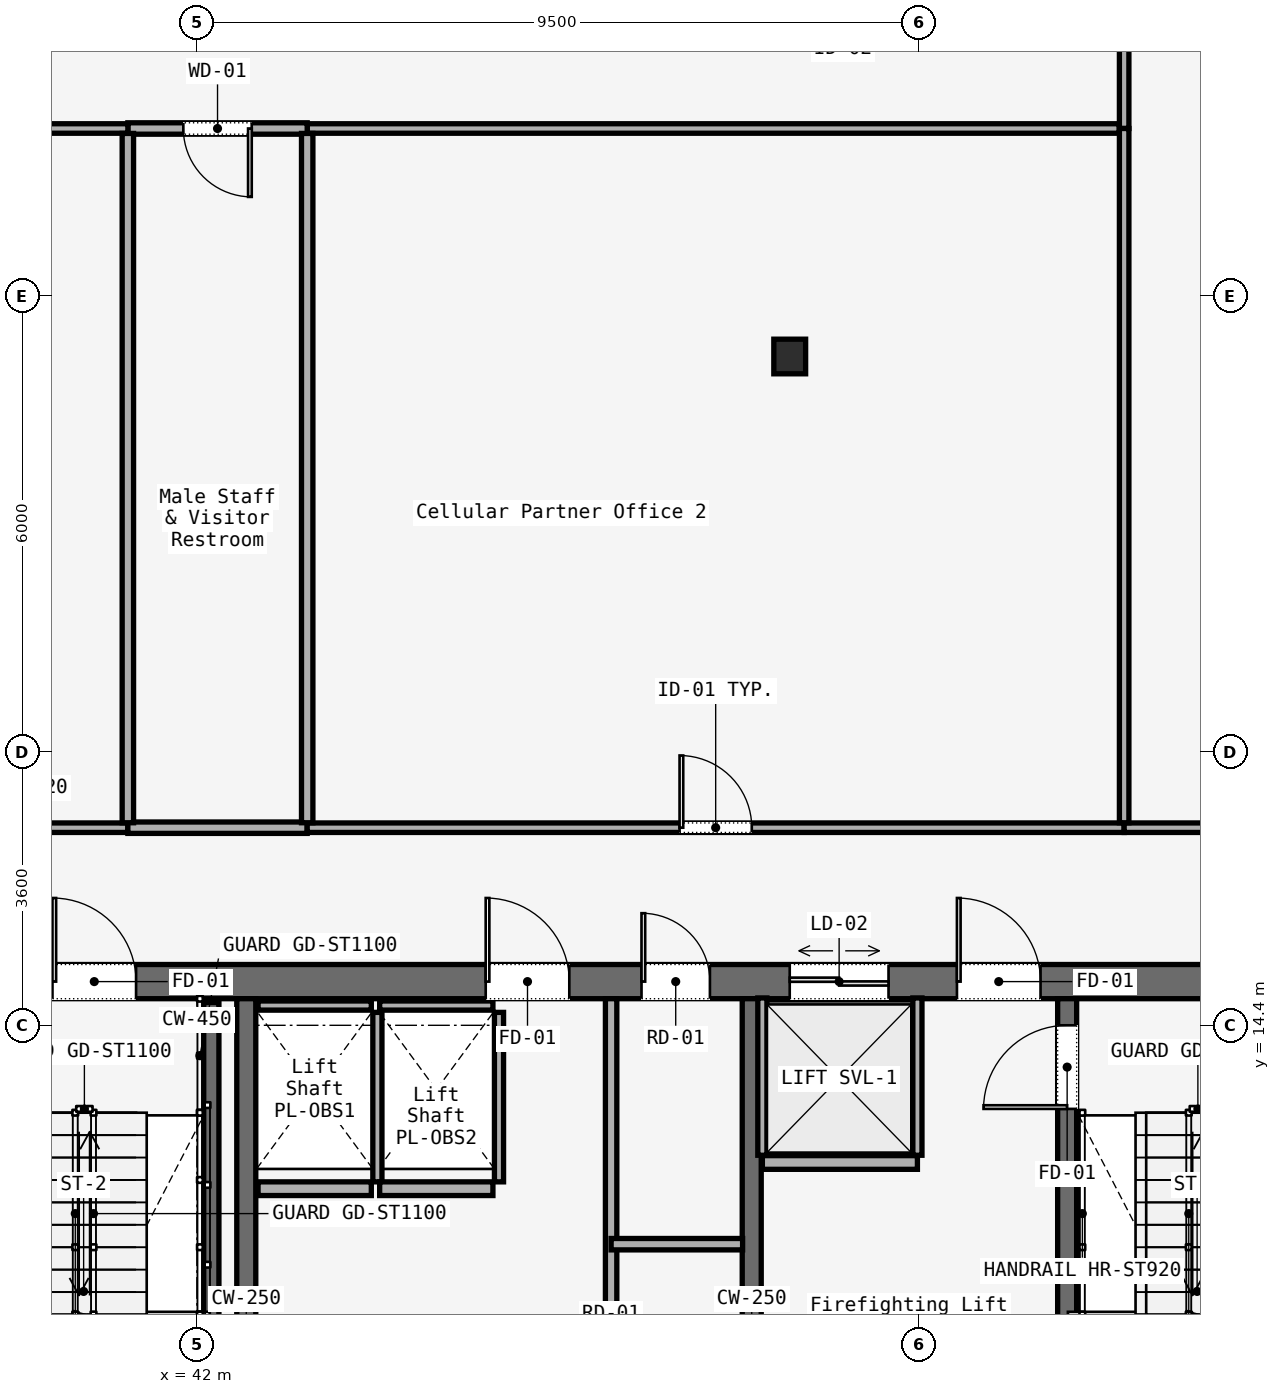
"""IFC4 building model, lengths in metres.
Left out: names, types, materials, properties, quantities, classifications, styles, units other than length and angle.
Written with IfcOpenShell. Run it as: python <this file> out.ifc"""

import sys

from ifc_helpers import new_model, si_unit, direction, frame, frame_2d, origin, origin_2d, place, context, subcontext, project, spatial, rectangle, i_section, extrude, element, fill, save


model = new_model("IFC4")
c1 = context("Model", 3, precision=1e-05, world=origin(), true_north=direction((0.0, 1.0)))
c2 = subcontext(c1, "Body", "Model", "MODEL_VIEW")
j1 = project(units=[si_unit("LENGTHUNIT", "METRE"), si_unit("PLANEANGLEUNIT", "RADIAN")], contexts=[c1])
p1 = place(None, origin())
s1 = spatial("IfcSite", under=j1, at=p1, CompositionType="ELEMENT")
p2 = place(p1, origin())
s2 = spatial("IfcBuilding", under=s1, at=p2, CompositionType="ELEMENT")
p3 = place(p2, frame((0.0, 0.0, 89.2)))
s3 = spatial("IfcBuildingStorey", under=s2, at=p3, CompositionType="ELEMENT", Elevation=89.2)
p4 = place(p3, frame((26.45, 14.975, 0.0), z_axis=(0.0, 0.0, 1.0), x_axis=(1.0, 0.0, 0.0)))
e1 = element("IfcWall", 1, at=p4, inside=s3, PredefinedType="SOLIDWALL", context=c2, shape_type="SweptSolid", body=[
    extrude(rectangle(XDim=31.1, YDim=0.45, at=frame_2d((15.55, 0.0))), origin(), (0.0, 0.0, 1.0), 3.58),
])
p5 = place(p4, frame((1.65, 0.0, 0.0)))
e2 = element("IfcOpeningElement", 2, at=p5, cuts=e1, PredefinedType="OPENING", context=c2, shape_type="SweptSolid", body=[
    extrude(rectangle(XDim=1.1, YDim=2.2, at=frame_2d((0.55, 1.1))), frame((0.0, 0.225, 0.0), z_axis=(0.0, -1.0, 0.0), x_axis=(1.0, 0.0, 0.0)), (0.0, 0.0, 1.0), 0.45),
])
p6 = place(p4, frame((13.65, 0.0, 0.0)))
e3 = element("IfcOpeningElement", 3, at=p6, cuts=e1, PredefinedType="OPENING", context=c2, shape_type="SweptSolid", body=[
    extrude(rectangle(XDim=1.1, YDim=2.2, at=frame_2d((0.55, 1.1))), frame((0.0, 0.225, 0.0), z_axis=(0.0, -1.0, 0.0), x_axis=(1.0, 0.0, 0.0)), (0.0, 0.0, 1.0), 0.45),
])
p7 = place(p4, frame((25.55, 0.0, 0.0)))
e4 = element("IfcOpeningElement", 4, at=p7, cuts=e1, PredefinedType="OPENING", context=c2, shape_type="SweptSolid", body=[
    extrude(rectangle(XDim=1.1, YDim=2.2, at=frame_2d((0.55, 1.1))), frame((0.0, 0.225, 0.0), z_axis=(0.0, -1.0, 0.0), x_axis=(1.0, 0.0, 0.0)), (0.0, 0.0, 1.0), 0.45),
])
p8 = place(p4, frame((10.7, 0.0, 0.0)))
e5 = element("IfcOpeningElement", 5, at=p8, cuts=e1, PredefinedType="OPENING", context=c2, shape_type="SweptSolid", body=[
    extrude(rectangle(XDim=1.4, YDim=2.2, at=frame_2d((0.7, 1.1))), frame((0.0, 0.225, 0.0), z_axis=(0.0, -1.0, 0.0), x_axis=(1.0, 0.0, 0.0)), (0.0, 0.0, 1.0), 0.45),
])
p9 = place(p4, frame((19.35, 0.0, 0.0)))
e6 = element("IfcOpeningElement", 6, at=p9, cuts=e1, PredefinedType="OPENING", context=c2, shape_type="SweptSolid", body=[
    extrude(rectangle(XDim=1.1, YDim=2.2, at=frame_2d((0.55, 1.1))), frame((0.0, 0.225, 0.0), z_axis=(0.0, -1.0, 0.0), x_axis=(1.0, 0.0, 0.0)), (0.0, 0.0, 1.0), 0.45),
])
p10 = place(p4, frame((21.4, 0.0, 0.0)))
e7 = element("IfcOpeningElement", 7, at=p10, cuts=e1, PredefinedType="OPENING", context=c2, shape_type="SweptSolid", body=[
    extrude(rectangle(XDim=0.9, YDim=2.1, at=frame_2d((0.45, 1.05))), frame((0.0, 0.225, 0.0), z_axis=(0.0, -1.0, 0.0), x_axis=(1.0, 0.0, 0.0)), (0.0, 0.0, 1.0), 0.45),
])
p11 = place(p4, frame((23.35, 0.0, 0.0)))
e8 = element("IfcOpeningElement", 8, at=p11, cuts=e1, PredefinedType="OPENING", context=c2, shape_type="SweptSolid", body=[
    extrude(rectangle(XDim=1.3, YDim=2.3, at=frame_2d((0.65, 1.15))), frame((0.0, 0.225, 0.0), z_axis=(0.0, -1.0, 0.0), x_axis=(1.0, 0.0, 0.0)), (0.0, 0.0, 1.0), 0.45),
])
for number, where, z_axis, x_axis in (
    (9, (42.65, 5.85, 0.0), (0.0, 0.0, 1.0), (0.0, 1.0, 0.0)),
    (10, (49.3, 5.85, 0.0), (0.0, 0.0, 1.0), (0.0, 1.0, 0.0)),
):
    element("IfcWall", number, at=place(p3, frame(where, z_axis=z_axis, x_axis=x_axis)), inside=s3, PredefinedType="SOLIDWALL", context=c2, shape_type="SweptSolid", body=[
        extrude(rectangle(XDim=8.9, YDim=0.25, at=frame_2d((4.45, 0.0))), origin(), (0.0, 0.0, 1.0), 3.58),
    ])
p12 = place(p3, frame((53.45, 5.85, 0.0), z_axis=(0.0, 0.0, 1.0), x_axis=(0.0, 1.0, 0.0)))
e11 = element("IfcWall", 11, at=p12, inside=s3, PredefinedType="SOLIDWALL", context=c2, shape_type="SweptSolid", body=[
    extrude(rectangle(XDim=8.9, YDim=0.25, at=frame_2d((4.45, 0.0))), origin(), (0.0, 0.0, 1.0), 3.58),
])
p13 = place(p12, frame((7.45, 0.0, 0.0)))
e12 = element("IfcOpeningElement", 12, at=p13, cuts=e11, PredefinedType="OPENING", context=c2, shape_type="SweptSolid", body=[
    extrude(rectangle(XDim=1.1, YDim=2.2, at=frame_2d((0.55, 1.1))), frame((0.0, 0.125, 0.0), z_axis=(0.0, -1.0, 0.0), x_axis=(1.0, 0.0, 0.0)), (0.0, 0.0, 1.0), 0.25),
])
p14 = place(p3, frame((49.8, 23.2, 0.0), z_axis=(0.0, 0.0, 1.0), x_axis=(1.0, 0.0, 0.0)))
e13 = element("IfcColumn", 13, at=p14, inside=s3, PredefinedType="COLUMN", context=c2, shape_type="SweptSolid", body=[
    extrude(i_section(OverallWidth=0.418, OverallDepth=0.456, WebThickness=0.042, FlangeThickness=0.067, FilletRadius=0.015, at=origin_2d()), origin(), (0.0, 0.0, 1.0), 3.58),
])
p15 = place(p3, frame((42.19, 14.7, 0.0), z_axis=(0.0, 0.0, 1.0), x_axis=(0.0, -1.0, 0.0)))
e14 = element("IfcWall", 14, at=p15, inside=s3, PredefinedType="SOLIDWALL", context=c2, shape_type="SweptSolid", body=[
    extrude(rectangle(XDim=7.65, YDim=0.2, at=frame_2d((3.825, 0.0))), origin(), (0.0, 0.0, 1.0), 3.8),
])
p16 = place(p3, frame((47.45, 5.9, 0.0), z_axis=(0.0, 0.0, 1.0), x_axis=(0.0, 1.0, 0.0)))
e15 = element("IfcWall", 15, at=p16, inside=s3, PredefinedType="PARTITIONING", context=c2, shape_type="SweptSolid", body=[
    extrude(rectangle(XDim=8.85, YDim=0.15, at=frame_2d((4.425, 0.0))), origin(), (0.0, 0.0, 1.0), 2.95),
])
p17 = place(p16, frame((3.2, 0.0, 0.0)))
e16 = element("IfcOpeningElement", 16, at=p17, cuts=e15, PredefinedType="OPENING", context=c2, shape_type="SweptSolid", body=[
    extrude(rectangle(XDim=0.9, YDim=2.1, at=frame_2d((0.45, 1.05))), frame((0.0, 0.075, 0.0), z_axis=(0.0, -1.0, 0.0), x_axis=(1.0, 0.0, 0.0)), (0.0, 0.0, 1.0), 0.15),
])
p18 = place(p3, frame((47.45, 11.52, 0.0), z_axis=(0.0, 0.0, 1.0), x_axis=(1.0, 0.0, 0.0)))
e17 = element("IfcWall", 17, at=p18, inside=s3, PredefinedType="PARTITIONING", context=c2, shape_type="SweptSolid", body=[
    extrude(rectangle(XDim=1.73, YDim=0.15, at=frame_2d((0.865, 0.0))), origin(), (0.0, 0.0, 1.0), 2.95),
])
p19 = place(p3, frame((42.805, 12.25, 0.0), z_axis=(0.0, 0.0, 1.0), x_axis=(1.0, 0.0, 0.0)))
e18 = element("IfcWall", 18, at=p19, inside=s3, PredefinedType="SOLIDWALL", context=c2, shape_type="SweptSolid", body=[
    extrude(rectangle(XDim=1.49, YDim=0.18, at=frame_2d((0.745, 0.0))), origin(), (0.0, 0.0, 1.0), 2.95),
])
p20 = place(p3, frame((42.805, 14.66, 0.0), z_axis=(0.0, 0.0, 1.0), x_axis=(1.0, 0.0, 0.0)))
e19 = element("IfcWall", 19, at=p20, inside=s3, PredefinedType="SOLIDWALL", context=c2, shape_type="SweptSolid", body=[
    extrude(rectangle(XDim=1.49, YDim=0.12, at=frame_2d((0.745, 0.0))), origin(), (0.0, 0.0, 1.0), 2.95),
])
p21 = place(p3, frame((44.375, 12.34, 0.0), z_axis=(0.0, 0.0, 1.0), x_axis=(0.0, 1.0, 0.0)))
e20 = element("IfcWall", 20, at=p21, inside=s3, PredefinedType="SOLIDWALL", context=c2, shape_type="SweptSolid", body=[
    extrude(rectangle(XDim=2.23, YDim=0.12, at=frame_2d((1.115, 0.0))), origin(), (0.0, 0.0, 1.0), 2.95),
])
p22 = place(p3, frame((44.405, 12.25, 0.0), z_axis=(0.0, 0.0, 1.0), x_axis=(1.0, 0.0, 0.0)))
e21 = element("IfcWall", 21, at=p22, inside=s3, PredefinedType="SOLIDWALL", context=c2, shape_type="SweptSolid", body=[
    extrude(rectangle(XDim=1.49, YDim=0.18, at=frame_2d((0.745, 0.0))), origin(), (0.0, 0.0, 1.0), 2.95),
])
p23 = place(p3, frame((44.405, 14.66, 0.0), z_axis=(0.0, 0.0, 1.0), x_axis=(1.0, 0.0, 0.0)))
e22 = element("IfcWall", 22, at=p23, inside=s3, PredefinedType="SOLIDWALL", context=c2, shape_type="SweptSolid", body=[
    extrude(rectangle(XDim=1.49, YDim=0.12, at=frame_2d((0.745, 0.0))), origin(), (0.0, 0.0, 1.0), 2.95),
])
p24 = place(p3, frame((45.975, 12.34, 0.0), z_axis=(0.0, 0.0, 1.0), x_axis=(0.0, 1.0, 0.0)))
e23 = element("IfcWall", 23, at=p24, inside=s3, PredefinedType="SOLIDWALL", context=c2, shape_type="SweptSolid", body=[
    extrude(rectangle(XDim=2.23, YDim=0.12, at=frame_2d((1.115, 0.0))), origin(), (0.0, 0.0, 1.0), 2.95),
])
p25 = place(p3, frame((49.44, 12.595, 0.0), z_axis=(0.0, 0.0, 1.0), x_axis=(1.0, 0.0, 0.0)))
e24 = element("IfcWall", 24, at=p25, inside=s3, PredefinedType="SOLIDWALL", context=c2, shape_type="SweptSolid", body=[
    extrude(rectangle(XDim=2.04, YDim=0.18, at=frame_2d((1.02, 0.0))), origin(), (0.0, 0.0, 1.0), 2.95),
])
for number, where, z_axis, x_axis in (
    (25, (49.44, 12.69, 0.0), (0.0, 0.0, 1.0), (0.0, 1.0, 0.0)),
    (26, (51.48, 12.69, 0.0), (0.0, 0.0, 1.0), (0.0, 1.0, 0.0)),
):
    element("IfcWall", number, at=place(p3, frame(where, z_axis=z_axis, x_axis=x_axis)), inside=s3, PredefinedType="SOLIDWALL", context=c2, shape_type="SweptSolid", body=[
        extrude(rectangle(XDim=2.07, YDim=0.12, at=frame_2d((1.035, 0.0))), origin(), (0.0, 0.0, 1.0), 2.95),
    ])
p26 = place(p3, frame((54.2, 27.935, 0.0), z_axis=(0.0, 0.0, 1.0), x_axis=(0.0, -1.0, 0.0)))
e27 = element("IfcWall", 27, at=p26, inside=s3, PredefinedType="PARTITIONING", context=c2, shape_type="SweptSolid", body=[
    extrude(rectangle(XDim=1.735, YDim=0.125, at=frame_2d((0.868, 0.0))), origin(), (0.0, 0.0, 1.0), 2.95),
])
p27 = place(p3, frame((54.135, 26.2, 0.0), z_axis=(0.0, 0.0, 1.0), x_axis=(-1.0, 0.0, 0.0)))
e28 = element("IfcWall", 28, at=p27, inside=s3, PredefinedType="PARTITIONING", context=c2, shape_type="SweptSolid", body=[
    extrude(rectangle(XDim=10.684, YDim=0.125, at=frame_2d((5.342, 0.0))), origin(), (0.0, 0.0, 1.0), 2.95),
])
p28 = place(p3, frame((43.451, 26.2, 0.0), z_axis=(0.0, 0.0, 1.0), x_axis=(-1.0, 0.0, 0.0)))
e29 = element("IfcWall", 29, at=p28, inside=s3, PredefinedType="PARTITIONING", context=c2, shape_type="SweptSolid", body=[
    extrude(rectangle(XDim=2.359, YDim=0.15, at=frame_2d((1.18, 0.0))), origin(), (0.0, 0.0, 1.0), 2.95),
])
p29 = place(p28, frame((0.73, 0.0, 0.0)))
e30 = element("IfcOpeningElement", 30, at=p29, cuts=e29, PredefinedType="OPENING", context=c2, shape_type="SweptSolid", body=[
    extrude(rectangle(XDim=0.9, YDim=2.15, at=frame_2d((0.45, 1.075))), frame((0.0, 0.075, 0.0), z_axis=(0.0, -1.0, 0.0), x_axis=(1.0, 0.0, 0.0)), (0.0, 0.0, 1.0), 0.15),
])
p30 = place(p3, frame((41.092, 26.2, 0.0), z_axis=(0.0, 0.0, 1.0), x_axis=(-1.0, 0.0, 0.0)))
e31 = element("IfcWall", 31, at=p30, inside=s3, PredefinedType="PARTITIONING", context=c2, shape_type="SweptSolid", body=[
    extrude(rectangle(XDim=9.492, YDim=0.125, at=frame_2d((4.746, 0.0))), origin(), (0.0, 0.0, 1.0), 2.95),
])
p31 = place(p30, frame((4.046, 0.0, 0.0)))
e32 = element("IfcOpeningElement", 32, at=p31, cuts=e31, PredefinedType="OPENING", context=c2, shape_type="SweptSolid", body=[
    extrude(rectangle(XDim=1.4, YDim=2.2, at=frame_2d((0.7, 1.1))), frame((0.0, 0.062, 0.0), z_axis=(0.0, -1.0, 0.0), x_axis=(1.0, 0.0, 0.0)), (0.0, 0.0, 1.0), 0.125),
])
p32 = place(p3, frame((31.665, 17.0, 0.0), z_axis=(0.0, 0.0, 1.0), x_axis=(1.0, 0.0, 0.0)))
e33 = element("IfcWall", 33, at=p32, inside=s3, PredefinedType="PARTITIONING", context=c2, shape_type="SweptSolid", body=[
    extrude(rectangle(XDim=9.427, YDim=0.125, at=frame_2d((4.713, 0.0))), origin(), (0.0, 0.0, 1.0), 2.95),
])
p33 = place(p3, frame((41.092, 17.0, 0.0), z_axis=(0.0, 0.0, 1.0), x_axis=(1.0, 0.0, 0.0)))
e34 = element("IfcWall", 34, at=p33, inside=s3, PredefinedType="PARTITIONING", context=c2, shape_type="SweptSolid", body=[
    extrude(rectangle(XDim=2.359, YDim=0.15, at=frame_2d((1.18, 0.0))), origin(), (0.0, 0.0, 1.0), 2.95),
])
p34 = place(p3, frame((43.451, 17.0, 0.0), z_axis=(0.0, 0.0, 1.0), x_axis=(1.0, 0.0, 0.0)))
e35 = element("IfcWall", 35, at=p34, inside=s3, PredefinedType="PARTITIONING", context=c2, shape_type="SweptSolid", body=[
    extrude(rectangle(XDim=10.749, YDim=0.125, at=frame_2d((5.374, 0.0))), origin(), (0.0, 0.0, 1.0), 2.95),
])
p35 = place(p34, frame((4.899, 0.0, 0.0)))
e36 = element("IfcOpeningElement", 36, at=p35, cuts=e35, PredefinedType="OPENING", context=c2, shape_type="SweptSolid", body=[
    extrude(rectangle(XDim=0.95, YDim=2.2, at=frame_2d((0.475, 1.1))), frame((0.0, 0.062, 0.0), z_axis=(0.0, -1.0, 0.0), x_axis=(1.0, 0.0, 0.0)), (0.0, 0.0, 1.0), 0.125),
])
p36 = place(p3, frame((54.2, 17.0, 0.0), z_axis=(0.0, 0.0, 1.0), x_axis=(1.0, 0.0, 0.0)))
e37 = element("IfcWall", 37, at=p36, inside=s3, PredefinedType="PARTITIONING", context=c2, shape_type="SweptSolid", body=[
    extrude(rectangle(XDim=4.135, YDim=0.125, at=frame_2d((2.067, 0.0))), origin(), (0.0, 0.0, 1.0), 2.95),
])
p37 = place(p36, frame((1.593, 0.0, 0.0)))
e38 = element("IfcOpeningElement", 38, at=p37, cuts=e37, PredefinedType="OPENING", context=c2, shape_type="SweptSolid", body=[
    extrude(rectangle(XDim=0.95, YDim=2.2, at=frame_2d((0.475, 1.1))), frame((0.0, 0.062, 0.0), z_axis=(0.0, -1.0, 0.0), x_axis=(1.0, 0.0, 0.0)), (0.0, 0.0, 1.0), 0.125),
])
for number, where, z_axis, x_axis in (
    (39, (41.092, 26.135, 0.0), (0.0, 0.0, 1.0), (0.0, -1.0, 0.0)),
    (40, (43.451, 26.135, 0.0), (0.0, 0.0, 1.0), (0.0, -1.0, 0.0)),
):
    element("IfcWall", number, at=place(p3, frame(where, z_axis=z_axis, x_axis=x_axis)), inside=s3, PredefinedType="PARTITIONING", context=c2, shape_type="SweptSolid", body=[
        extrude(rectangle(XDim=9.07, YDim=0.15, at=frame_2d((4.535, 0.0))), origin(), (0.0, 0.0, 1.0), 2.95),
    ])
p38 = place(p3, frame((54.2, 26.2, 0.0), z_axis=(0.0, 0.0, 1.0), x_axis=(0.0, -1.0, 0.0)))
e41 = element("IfcWall", 41, at=p38, inside=s3, PredefinedType="PARTITIONING", context=c2, shape_type="SweptSolid", body=[
    extrude(rectangle(XDim=9.135, YDim=0.125, at=frame_2d((4.567, 0.0))), origin(), (0.0, 0.0, 1.0), 2.95),
])
p39 = place(p6, origin())
e42 = element("IfcDoor", 42, at=p39, inside=s3, OperationType="SINGLE_SWING_RIGHT", PredefinedType="DOOR", context=c2, shape_type="SweptSolid", body=[
    extrude(rectangle(XDim=1.1, YDim=2.2, at=frame_2d((0.55, 1.1))), frame((0.0, 0.025, 0.0), z_axis=(0.0, -1.0, 0.0), x_axis=(1.0, 0.0, 0.0)), (0.0, 0.0, 1.0), 0.05),
])
fill(e3, e42)
p40 = place(p7, origin())
e43 = element("IfcDoor", 43, at=p40, inside=s3, OperationType="SINGLE_SWING_RIGHT", PredefinedType="DOOR", context=c2, shape_type="SweptSolid", body=[
    extrude(rectangle(XDim=1.1, YDim=2.2, at=frame_2d((0.55, 1.1))), frame((0.0, 0.025, 0.0), z_axis=(0.0, -1.0, 0.0), x_axis=(1.0, 0.0, 0.0)), (0.0, 0.0, 1.0), 0.05),
])
fill(e4, e43)
p41 = place(p9, origin())
e44 = element("IfcDoor", 44, at=p41, inside=s3, OperationType="SINGLE_SWING_LEFT", PredefinedType="DOOR", context=c2, shape_type="SweptSolid", body=[
    extrude(rectangle(XDim=1.1, YDim=2.2, at=frame_2d((0.55, 1.1))), frame((0.0, 0.025, 0.0), z_axis=(0.0, -1.0, 0.0), x_axis=(1.0, 0.0, 0.0)), (0.0, 0.0, 1.0), 0.05),
])
fill(e6, e44)
p42 = place(p10, origin())
e45 = element("IfcDoor", 45, at=p42, inside=s3, OperationType="SINGLE_SWING_LEFT", PredefinedType="DOOR", context=c2, shape_type="SweptSolid", body=[
    extrude(rectangle(XDim=0.9, YDim=2.1, at=frame_2d((0.45, 1.05))), frame((0.0, 0.025, 0.0), z_axis=(0.0, -1.0, 0.0), x_axis=(1.0, 0.0, 0.0)), (0.0, 0.0, 1.0), 0.05),
])
fill(e7, e45)
p43 = place(p13, origin())
e46 = element("IfcDoor", 46, at=p43, inside=s3, OperationType="SINGLE_SWING_LEFT", PredefinedType="DOOR", context=c2, shape_type="SweptSolid", body=[
    extrude(rectangle(XDim=1.1, YDim=2.2, at=frame_2d((0.55, 1.1))), frame((0.0, 0.025, 0.0), z_axis=(0.0, -1.0, 0.0), x_axis=(1.0, 0.0, 0.0)), (0.0, 0.0, 1.0), 0.05),
])
fill(e12, e46)
p44 = place(p11, origin())
e47 = element("IfcDoor", 47, at=p44, inside=s3, OperationType="DOUBLE_DOOR_SLIDING", PredefinedType="DOOR", context=c2, shape_type="SweptSolid", body=[
    extrude(rectangle(XDim=1.3, YDim=2.3, at=frame_2d((0.65, 1.15))), frame((0.0, 0.025, 0.0), z_axis=(0.0, -1.0, 0.0), x_axis=(1.0, 0.0, 0.0)), (0.0, 0.0, 1.0), 0.05),
])
fill(e8, e47)
p45 = place(p29, origin())
e48 = element("IfcDoor", 48, at=p45, inside=s3, OperationType="SINGLE_SWING_LEFT", PredefinedType="DOOR", context=c2, shape_type="SweptSolid", body=[
    extrude(rectangle(XDim=0.9, YDim=2.15, at=frame_2d((0.45, 1.075))), frame((0.0, 0.025, 0.0), z_axis=(0.0, -1.0, 0.0), x_axis=(1.0, 0.0, 0.0)), (0.0, 0.0, 1.0), 0.05),
])
fill(e30, e48)
p46 = place(p35, origin())
e49 = element("IfcDoor", 49, at=p46, inside=s3, OperationType="SINGLE_SWING_RIGHT", PredefinedType="DOOR", context=c2, shape_type="SweptSolid", body=[
    extrude(rectangle(XDim=0.95, YDim=2.2, at=frame_2d((0.475, 1.1))), frame((0.0, 0.025, 0.0), z_axis=(0.0, -1.0, 0.0), x_axis=(1.0, 0.0, 0.0)), (0.0, 0.0, 1.0), 0.05),
])
fill(e36, e49)
save(model, sys.argv[1])
